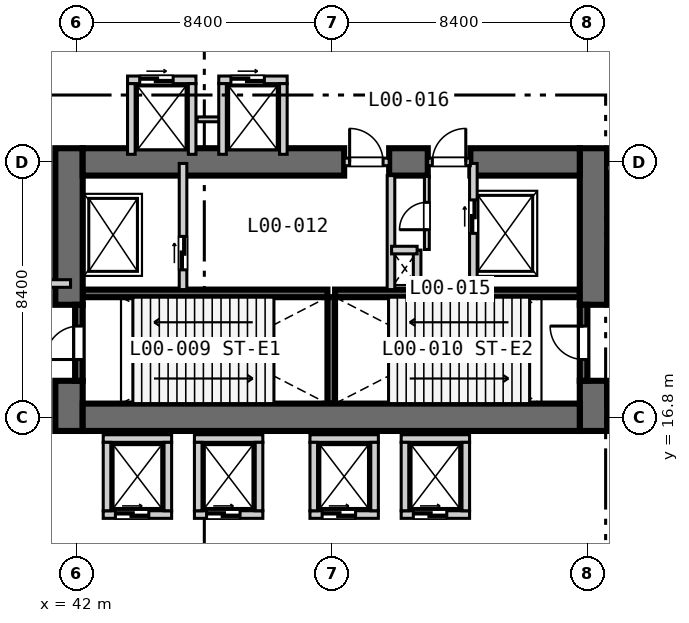
"""IFC4 building model, lengths in metres.
Left out: names, types, materials, properties, quantities, classifications, styles, units other than length and angle.
Written with IfcOpenShell. Run it as: python <this file> out.ifc"""

import sys

from ifc_helpers import new_model, si_unit, direction, frame, frame_2d, origin, place, context, subcontext, project, spatial, rectangle, extrude, element, fill, save


model = new_model("IFC4")
c1 = context("Model", 3, precision=1e-05, world=origin(), true_north=direction((0.0, 1.0)))
c2 = subcontext(c1, "Body", "Model", "MODEL_VIEW")
j1 = project(units=[si_unit("LENGTHUNIT", "METRE"), si_unit("PLANEANGLEUNIT", "RADIAN")], contexts=[c1])
p1 = place(None, origin())
s1 = spatial("IfcSite", under=j1, at=p1, CompositionType="ELEMENT")
p2 = place(p1, origin())
s2 = spatial("IfcBuilding", under=s1, at=p2, CompositionType="ELEMENT")
p3 = place(p2, origin())
s3 = spatial("IfcBuildingStorey", under=s2, at=p3, CompositionType="ELEMENT", Elevation=0.0)
for number, where, z_axis, x_axis in (
    (1, (42.2, 20.875, 0.0), (0.0, 0.0, 1.0), (1.0, 0.0, 0.0)),
    (2, (50.5, 20.875, 0.0), (0.0, 0.0, 1.0), (1.0, 0.0, 0.0)),
):
    element("IfcWall", number, at=place(p3, frame(where, z_axis=z_axis, x_axis=x_axis)), inside=s3, PredefinedType="SOLIDWALL", context=c2, shape_type="SweptSolid", body=[
        extrude(rectangle(XDim=8.05, YDim=0.25, at=frame_2d((4.025, 0.0))), origin(), (0.0, 0.0, 1.0), 5.65),
    ])
p4 = place(p3, frame((50.375, 17.25, 0.0), z_axis=(0.0, 0.0, 1.0), x_axis=(0.0, 1.0, 0.0)))
e3 = element("IfcWall", 3, at=p4, inside=s3, PredefinedType="SOLIDWALL", context=c2, shape_type="SweptSolid", body=[
    extrude(rectangle(XDim=3.5, YDim=0.25, at=frame_2d((1.75, 0.0))), origin(), (0.0, 0.0, 1.0), 5.65),
])
p5 = place(p3, frame((41.75, 16.35, 0.0), z_axis=(0.0, 0.0, 1.0), x_axis=(0.0, 1.0, 0.0)))
e4 = element("IfcWall", 4, at=p5, inside=s3, PredefinedType="SHEAR", context=c2, shape_type="SweptSolid", body=[
    extrude(rectangle(XDim=1.65, YDim=0.9, at=frame_2d((0.825, 0.0))), origin(), (0.0, 0.0, 1.0), 5.65),
])
p6 = place(p3, frame((41.75, 20.5, 0.0), z_axis=(0.0, 0.0, 1.0), x_axis=(0.0, 1.0, 0.0)))
e5 = element("IfcWall", 5, at=p6, inside=s3, PredefinedType="SHEAR", context=c2, shape_type="SweptSolid", body=[
    extrude(rectangle(XDim=5.15, YDim=0.9, at=frame_2d((2.575, 0.0))), origin(), (0.0, 0.0, 1.0), 5.65),
])
p7 = place(p3, frame((59.0, 16.35, 0.0), z_axis=(0.0, 0.0, 1.0), x_axis=(0.0, 1.0, 0.0)))
e6 = element("IfcWall", 6, at=p7, inside=s3, PredefinedType="SHEAR", context=c2, shape_type="SweptSolid", body=[
    extrude(rectangle(XDim=1.65, YDim=0.9, at=frame_2d((0.825, 0.0))), origin(), (0.0, 0.0, 1.0), 5.65),
])
p8 = place(p3, frame((59.0, 20.5, 0.0), z_axis=(0.0, 0.0, 1.0), x_axis=(0.0, 1.0, 0.0)))
e7 = element("IfcWall", 7, at=p8, inside=s3, PredefinedType="SHEAR", context=c2, shape_type="SweptSolid", body=[
    extrude(rectangle(XDim=5.15, YDim=0.9, at=frame_2d((2.575, 0.0))), origin(), (0.0, 0.0, 1.0), 5.65),
])
p9 = place(p3, frame((42.2, 16.8, 0.0), z_axis=(0.0, 0.0, 1.0), x_axis=(1.0, 0.0, 0.0)))
e8 = element("IfcWall", 8, at=p9, inside=s3, PredefinedType="SHEAR", context=c2, shape_type="SweptSolid", body=[
    extrude(rectangle(XDim=16.35, YDim=0.9, at=frame_2d((8.175, 0.0))), origin(), (0.0, 0.0, 1.0), 5.65),
])
p10 = place(p3, frame((42.2, 25.2, 0.0), z_axis=(0.0, 0.0, 1.0), x_axis=(1.0, 0.0, 0.0)))
e9 = element("IfcWall", 9, at=p10, inside=s3, PredefinedType="SHEAR", context=c2, shape_type="SweptSolid", body=[
    extrude(rectangle(XDim=8.6, YDim=0.9, at=frame_2d((4.3, 0.0))), origin(), (0.0, 0.0, 1.0), 5.65),
])
p11 = place(p3, frame((52.28, 25.2, 0.0), z_axis=(0.0, 0.0, 1.0), x_axis=(1.0, 0.0, 0.0)))
e10 = element("IfcWall", 10, at=p11, inside=s3, PredefinedType="SHEAR", context=c2, shape_type="SweptSolid", body=[
    extrude(rectangle(XDim=1.27, YDim=0.9, at=frame_2d((0.635, 0.0))), origin(), (0.0, 0.0, 1.0), 5.65),
])
p12 = place(p3, frame((54.95, 25.2, 0.0), z_axis=(0.0, 0.0, 1.0), x_axis=(1.0, 0.0, 0.0)))
e11 = element("IfcWall", 11, at=p12, inside=s3, PredefinedType="SHEAR", context=c2, shape_type="SweptSolid", body=[
    extrude(rectangle(XDim=3.6, YDim=0.9, at=frame_2d((1.8, 0.0))), origin(), (0.0, 0.0, 1.0), 5.65),
])
p13 = place(p3, frame((42.075, 18.0, 0.0), z_axis=(0.0, 0.0, 1.0), x_axis=(0.0, 1.0, 0.0)))
e12 = element("IfcWall", 12, at=p13, inside=s3, PredefinedType="SOLIDWALL", context=c2, shape_type="SweptSolid", body=[
    extrude(rectangle(XDim=2.5, YDim=0.25, at=frame_2d((1.25, 0.0))), origin(), (0.0, 0.0, 1.0), 5.65),
])
p14 = place(p13, frame((0.7, 0.0, 0.0)))
e13 = element("IfcOpeningElement", 13, at=p14, cuts=e12, PredefinedType="OPENING", context=c2, shape_type="SweptSolid", body=[
    extrude(rectangle(XDim=1.1, YDim=2.15, at=frame_2d((0.55, 1.075))), frame((0.0, 0.135, 0.0), z_axis=(0.0, -1.0, 0.0), x_axis=(1.0, 0.0, 0.0)), (0.0, 0.0, 1.0), 0.27),
])
p15 = place(p3, frame((58.675, 18.0, 0.0), z_axis=(0.0, 0.0, 1.0), x_axis=(0.0, 1.0, 0.0)))
e14 = element("IfcWall", 14, at=p15, inside=s3, PredefinedType="SOLIDWALL", context=c2, shape_type="SweptSolid", body=[
    extrude(rectangle(XDim=2.5, YDim=0.25, at=frame_2d((1.25, 0.0))), origin(), (0.0, 0.0, 1.0), 5.65),
])
p16 = place(p15, frame((0.7, 0.0, 0.0)))
e15 = element("IfcOpeningElement", 15, at=p16, cuts=e14, PredefinedType="OPENING", context=c2, shape_type="SweptSolid", body=[
    extrude(rectangle(XDim=1.1, YDim=2.15, at=frame_2d((0.55, 1.075))), frame((0.0, 0.135, 0.0), z_axis=(0.0, -1.0, 0.0), x_axis=(1.0, 0.0, 0.0)), (0.0, 0.0, 1.0), 0.27),
])
p17 = place(p3, frame((45.5, 21.0, 0.0), z_axis=(0.0, 0.0, 1.0), x_axis=(0.0, 1.0, 0.0)))
e16 = element("IfcWall", 16, at=p17, inside=s3, PredefinedType="SOLIDWALL", context=c2, shape_type="SweptSolid", body=[
    extrude(rectangle(XDim=4.15, YDim=0.25, at=frame_2d((2.075, 0.0))), origin(), (0.0, 0.0, 1.0), 5.65),
])
p18 = place(p17, frame((0.65, 0.0, 0.0)))
e17 = element("IfcOpeningElement", 17, at=p18, cuts=e16, PredefinedType="OPENING", context=c2, shape_type="SweptSolid", body=[
    extrude(rectangle(XDim=1.1, YDim=2.15, at=frame_2d((0.55, 1.075))), frame((0.0, 0.135, 0.0), z_axis=(0.0, -1.0, 0.0), x_axis=(1.0, 0.0, 0.0)), (0.0, 0.0, 1.0), 0.27),
])
p19 = place(p3, frame((50.8, 25.2, 0.0), z_axis=(0.0, 0.0, 1.0), x_axis=(1.0, 0.0, 0.0)))
e18 = element("IfcWall", 18, at=p19, inside=s3, PredefinedType="SOLIDWALL", context=c2, shape_type="SweptSolid", body=[
    extrude(rectangle(XDim=1.48, YDim=0.25, at=frame_2d((0.74, 0.0))), origin(), (0.0, 0.0, 1.0), 5.65),
])
p20 = place(p19, frame((0.18, 0.0, 0.0)))
e19 = element("IfcOpeningElement", 19, at=p20, cuts=e18, PredefinedType="OPENING", context=c2, shape_type="SweptSolid", body=[
    extrude(rectangle(XDim=1.1, YDim=2.15, at=frame_2d((0.55, 1.075))), frame((0.0, 0.135, 0.0), z_axis=(0.0, -1.0, 0.0), x_axis=(1.0, 0.0, 0.0)), (0.0, 0.0, 1.0), 0.27),
])
p21 = place(p3, frame((52.34, 21.0, 0.0), z_axis=(0.0, 0.0, 1.0), x_axis=(0.0, 1.0, 0.0)))
e20 = element("IfcWall", 20, at=p21, inside=s3, PredefinedType="SOLIDWALL", context=c2, shape_type="SweptSolid", body=[
    extrude(rectangle(XDim=3.75, YDim=0.25, at=frame_2d((1.875, 0.0))), origin(), (0.0, 0.0, 1.0), 5.65),
])
p22 = place(p3, frame((55.05, 21.0, 0.0), z_axis=(0.0, 0.0, 1.0), x_axis=(0.0, 1.0, 0.0)))
e21 = element("IfcWall", 21, at=p22, inside=s3, PredefinedType="SOLIDWALL", context=c2, shape_type="SweptSolid", body=[
    extrude(rectangle(XDim=4.15, YDim=0.25, at=frame_2d((2.075, 0.0))), origin(), (0.0, 0.0, 1.0), 5.65),
])
p23 = place(p22, frame((1.85, 0.0, 0.0)))
e22 = element("IfcOpeningElement", 22, at=p23, cuts=e21, PredefinedType="OPENING", context=c2, shape_type="SweptSolid", body=[
    extrude(rectangle(XDim=1.1, YDim=2.15, at=frame_2d((0.55, 1.075))), frame((0.0, 0.135, 0.0), z_axis=(0.0, -1.0, 0.0), x_axis=(1.0, 0.0, 0.0)), (0.0, 0.0, 1.0), 0.27),
])
p24 = place(p3, frame((53.55, 25.2, 0.0), z_axis=(0.0, 0.0, 1.0), x_axis=(1.0, 0.0, 0.0)))
e23 = element("IfcWall", 23, at=p24, inside=s3, PredefinedType="SOLIDWALL", context=c2, shape_type="SweptSolid", body=[
    extrude(rectangle(XDim=1.4, YDim=0.25, at=frame_2d((0.7, 0.0))), origin(), (0.0, 0.0, 1.0), 5.65),
])
p25 = place(p24, frame((0.15, 0.0, 0.0)))
e24 = element("IfcOpeningElement", 24, at=p25, cuts=e23, PredefinedType="OPENING", context=c2, shape_type="SweptSolid", body=[
    extrude(rectangle(XDim=1.1, YDim=2.15, at=frame_2d((0.55, 1.075))), frame((0.0, 0.135, 0.0), z_axis=(0.0, -1.0, 0.0), x_axis=(1.0, 0.0, 0.0)), (0.0, 0.0, 1.0), 0.27),
])
p26 = place(p3, frame((53.2, 21.0, 0.0), z_axis=(0.0, 0.0, 1.0), x_axis=(0.0, 1.0, 0.0)))
e25 = element("IfcWall", 25, at=p26, inside=s3, PredefinedType="SOLIDWALL", context=c2, shape_type="SweptSolid", body=[
    extrude(rectangle(XDim=1.3, YDim=0.25, at=frame_2d((0.65, 0.0))), origin(), (0.0, 0.0, 1.0), 5.65),
])
p27 = place(p3, frame((52.36, 22.3, 0.0), z_axis=(0.0, 0.0, 1.0), x_axis=(1.0, 0.0, 0.0)))
e26 = element("IfcWall", 26, at=p27, inside=s3, PredefinedType="SOLIDWALL", context=c2, shape_type="SweptSolid", body=[
    extrude(rectangle(XDim=0.84, YDim=0.25, at=frame_2d((0.42, 0.0))), origin(), (0.0, 0.0, 1.0), 5.65),
])
p28 = place(p3, frame((53.52, 22.32, 0.0), z_axis=(0.0, 0.0, 1.0), x_axis=(0.0, 1.0, 0.0)))
e27 = element("IfcWall", 27, at=p28, inside=s3, PredefinedType="PARTITIONING", context=c2, shape_type="SweptSolid", body=[
    extrude(rectangle(XDim=2.4, YDim=0.16, at=frame_2d((1.2, 0.0))), origin(), (0.0, 0.0, 1.0), 5.65),
])
p29 = place(p28, frame((0.65, 0.0, 0.0)))
e28 = element("IfcOpeningElement", 28, at=p29, cuts=e27, PredefinedType="OPENING", context=c2, shape_type="SweptSolid", body=[
    extrude(rectangle(XDim=0.9, YDim=2.1, at=frame_2d((0.45, 1.05))), frame((0.0, 0.09, 0.0), z_axis=(0.0, -1.0, 0.0), x_axis=(1.0, 0.0, 0.0)), (0.0, 0.0, 1.0), 0.18),
])
p30 = place(p3, frame((42.875, 13.6, 0.0), z_axis=(0.0, 0.0, 1.0), x_axis=(1.0, 0.0, 0.0)))
e29 = element("IfcWall", 29, at=p30, inside=s3, PredefinedType="SOLIDWALL", context=c2, shape_type="SweptSolid", body=[
    extrude(rectangle(XDim=2.25, YDim=0.25, at=frame_2d((1.125, 0.0))), origin(), (0.0, 0.0, 1.0), 5.65),
])
p31 = place(p30, frame((0.4, 0.0, 0.0)))
e30 = element("IfcOpeningElement", 30, at=p31, cuts=e29, PredefinedType="OPENING", context=c2, shape_type="SweptSolid", body=[
    extrude(rectangle(XDim=1.1, YDim=2.15, at=frame_2d((0.55, 1.075))), frame((0.0, 0.135, 0.0), z_axis=(0.0, -1.0, 0.0), x_axis=(1.0, 0.0, 0.0)), (0.0, 0.0, 1.0), 0.27),
])
for number, where, z_axis, x_axis in (
    (31, (42.875, 16.1, 0.0), (0.0, 0.0, 1.0), (1.0, 0.0, 0.0)),
    (32, (43.0, 13.725, 0.0), (0.0, 0.0, 1.0), (0.0, 1.0, 0.0)),
    (33, (45.0, 13.725, 0.0), (0.0, 0.0, 1.0), (0.0, 1.0, 0.0)),
):
    element("IfcWall", number, at=place(p3, frame(where, z_axis=z_axis, x_axis=x_axis)), inside=s3, PredefinedType="SOLIDWALL", context=c2, shape_type="SweptSolid", body=[
        extrude(rectangle(XDim=2.25, YDim=0.25, at=frame_2d((1.125, 0.0))), origin(), (0.0, 0.0, 1.0), 5.65),
    ])
p32 = place(p3, frame((45.875, 13.6, 0.0), z_axis=(0.0, 0.0, 1.0), x_axis=(1.0, 0.0, 0.0)))
e34 = element("IfcWall", 34, at=p32, inside=s3, PredefinedType="SOLIDWALL", context=c2, shape_type="SweptSolid", body=[
    extrude(rectangle(XDim=2.25, YDim=0.25, at=frame_2d((1.125, 0.0))), origin(), (0.0, 0.0, 1.0), 5.65),
])
p33 = place(p32, frame((0.4, 0.0, 0.0)))
e35 = element("IfcOpeningElement", 35, at=p33, cuts=e34, PredefinedType="OPENING", context=c2, shape_type="SweptSolid", body=[
    extrude(rectangle(XDim=1.1, YDim=2.15, at=frame_2d((0.55, 1.075))), frame((0.0, 0.135, 0.0), z_axis=(0.0, -1.0, 0.0), x_axis=(1.0, 0.0, 0.0)), (0.0, 0.0, 1.0), 0.27),
])
for number, where, z_axis, x_axis in (
    (36, (45.875, 16.1, 0.0), (0.0, 0.0, 1.0), (1.0, 0.0, 0.0)),
    (37, (46.0, 13.725, 0.0), (0.0, 0.0, 1.0), (0.0, 1.0, 0.0)),
    (38, (48.0, 13.725, 0.0), (0.0, 0.0, 1.0), (0.0, 1.0, 0.0)),
):
    element("IfcWall", number, at=place(p3, frame(where, z_axis=z_axis, x_axis=x_axis)), inside=s3, PredefinedType="SOLIDWALL", context=c2, shape_type="SweptSolid", body=[
        extrude(rectangle(XDim=2.25, YDim=0.25, at=frame_2d((1.125, 0.0))), origin(), (0.0, 0.0, 1.0), 5.65),
    ])
p34 = place(p3, frame((49.675, 13.6, 0.0), z_axis=(0.0, 0.0, 1.0), x_axis=(1.0, 0.0, 0.0)))
e39 = element("IfcWall", 39, at=p34, inside=s3, PredefinedType="SOLIDWALL", context=c2, shape_type="SweptSolid", body=[
    extrude(rectangle(XDim=2.25, YDim=0.25, at=frame_2d((1.125, 0.0))), origin(), (0.0, 0.0, 1.0), 5.65),
])
p35 = place(p34, frame((0.4, 0.0, 0.0)))
e40 = element("IfcOpeningElement", 40, at=p35, cuts=e39, PredefinedType="OPENING", context=c2, shape_type="SweptSolid", body=[
    extrude(rectangle(XDim=1.1, YDim=2.15, at=frame_2d((0.55, 1.075))), frame((0.0, 0.135, 0.0), z_axis=(0.0, -1.0, 0.0), x_axis=(1.0, 0.0, 0.0)), (0.0, 0.0, 1.0), 0.27),
])
for number, where, z_axis, x_axis in (
    (41, (49.675, 16.1, 0.0), (0.0, 0.0, 1.0), (1.0, 0.0, 0.0)),
    (42, (49.8, 13.725, 0.0), (0.0, 0.0, 1.0), (0.0, 1.0, 0.0)),
    (43, (51.8, 13.725, 0.0), (0.0, 0.0, 1.0), (0.0, 1.0, 0.0)),
):
    element("IfcWall", number, at=place(p3, frame(where, z_axis=z_axis, x_axis=x_axis)), inside=s3, PredefinedType="SOLIDWALL", context=c2, shape_type="SweptSolid", body=[
        extrude(rectangle(XDim=2.25, YDim=0.25, at=frame_2d((1.125, 0.0))), origin(), (0.0, 0.0, 1.0), 5.65),
    ])
p36 = place(p3, frame((52.675, 13.6, 0.0), z_axis=(0.0, 0.0, 1.0), x_axis=(1.0, 0.0, 0.0)))
e44 = element("IfcWall", 44, at=p36, inside=s3, PredefinedType="SOLIDWALL", context=c2, shape_type="SweptSolid", body=[
    extrude(rectangle(XDim=2.25, YDim=0.25, at=frame_2d((1.125, 0.0))), origin(), (0.0, 0.0, 1.0), 5.65),
])
p37 = place(p36, frame((0.4, 0.0, 0.0)))
e45 = element("IfcOpeningElement", 45, at=p37, cuts=e44, PredefinedType="OPENING", context=c2, shape_type="SweptSolid", body=[
    extrude(rectangle(XDim=1.1, YDim=2.15, at=frame_2d((0.55, 1.075))), frame((0.0, 0.135, 0.0), z_axis=(0.0, -1.0, 0.0), x_axis=(1.0, 0.0, 0.0)), (0.0, 0.0, 1.0), 0.27),
])
for number, where, z_axis, x_axis in (
    (46, (52.675, 16.1, 0.0), (0.0, 0.0, 1.0), (1.0, 0.0, 0.0)),
    (47, (52.8, 13.725, 0.0), (0.0, 0.0, 1.0), (0.0, 1.0, 0.0)),
    (48, (54.8, 13.725, 0.0), (0.0, 0.0, 1.0), (0.0, 1.0, 0.0)),
):
    element("IfcWall", number, at=place(p3, frame(where, z_axis=z_axis, x_axis=x_axis)), inside=s3, PredefinedType="SOLIDWALL", context=c2, shape_type="SweptSolid", body=[
        extrude(rectangle(XDim=2.25, YDim=0.25, at=frame_2d((1.125, 0.0))), origin(), (0.0, 0.0, 1.0), 5.65),
    ])
p38 = place(p3, frame((43.675, 27.9, 0.0), z_axis=(0.0, 0.0, 1.0), x_axis=(1.0, 0.0, 0.0)))
e49 = element("IfcWall", 49, at=p38, inside=s3, PredefinedType="SOLIDWALL", context=c2, shape_type="SweptSolid", body=[
    extrude(rectangle(XDim=2.25, YDim=0.25, at=frame_2d((1.125, 0.0))), origin(), (0.0, 0.0, 1.0), 5.65),
])
p39 = place(p38, frame((0.4, 0.0, 0.0)))
e50 = element("IfcOpeningElement", 50, at=p39, cuts=e49, PredefinedType="OPENING", context=c2, shape_type="SweptSolid", body=[
    extrude(rectangle(XDim=1.1, YDim=2.15, at=frame_2d((0.55, 1.075))), frame((0.0, 0.135, 0.0), z_axis=(0.0, -1.0, 0.0), x_axis=(1.0, 0.0, 0.0)), (0.0, 0.0, 1.0), 0.27),
])
for number, where, z_axis, x_axis in (
    (51, (43.8, 25.45, 0.0), (0.0, 0.0, 1.0), (0.0, 1.0, 0.0)),
    (52, (45.8, 25.45, 0.0), (0.0, 0.0, 1.0), (0.0, 1.0, 0.0)),
):
    element("IfcWall", number, at=place(p3, frame(where, z_axis=z_axis, x_axis=x_axis)), inside=s3, PredefinedType="SOLIDWALL", context=c2, shape_type="SweptSolid", body=[
        extrude(rectangle(XDim=2.325, YDim=0.25, at=frame_2d((1.163, 0.0))), origin(), (0.0, 0.0, 1.0), 5.65),
    ])
p40 = place(p3, frame((45.96, 26.6, 0.0), z_axis=(0.0, 0.0, 1.0), x_axis=(1.0, 0.0, 0.0)))
e53 = element("IfcWall", 53, at=p40, inside=s3, PredefinedType="PARTITIONING", context=c2, shape_type="SweptSolid", body=[
    extrude(rectangle(XDim=0.88, YDim=0.16, at=frame_2d((0.44, 0.0))), origin(), (0.0, 0.0, 1.0), 5.65),
])
p41 = place(p3, frame((46.675, 27.9, 0.0), z_axis=(0.0, 0.0, 1.0), x_axis=(1.0, 0.0, 0.0)))
e54 = element("IfcWall", 54, at=p41, inside=s3, PredefinedType="SOLIDWALL", context=c2, shape_type="SweptSolid", body=[
    extrude(rectangle(XDim=2.25, YDim=0.25, at=frame_2d((1.125, 0.0))), origin(), (0.0, 0.0, 1.0), 5.65),
])
p42 = place(p41, frame((0.4, 0.0, 0.0)))
e55 = element("IfcOpeningElement", 55, at=p42, cuts=e54, PredefinedType="OPENING", context=c2, shape_type="SweptSolid", body=[
    extrude(rectangle(XDim=1.1, YDim=2.15, at=frame_2d((0.55, 1.075))), frame((0.0, 0.135, 0.0), z_axis=(0.0, -1.0, 0.0), x_axis=(1.0, 0.0, 0.0)), (0.0, 0.0, 1.0), 0.27),
])
for number, where, z_axis, x_axis in (
    (56, (46.8, 25.45, 0.0), (0.0, 0.0, 1.0), (0.0, 1.0, 0.0)),
    (57, (48.8, 25.45, 0.0), (0.0, 0.0, 1.0), (0.0, 1.0, 0.0)),
):
    element("IfcWall", number, at=place(p3, frame(where, z_axis=z_axis, x_axis=x_axis)), inside=s3, PredefinedType="SOLIDWALL", context=c2, shape_type="SweptSolid", body=[
        extrude(rectangle(XDim=2.325, YDim=0.25, at=frame_2d((1.163, 0.0))), origin(), (0.0, 0.0, 1.0), 5.65),
    ])
p43 = place(p3, frame((39.2, 21.2, 0.0), z_axis=(0.0, 0.0, 1.0), x_axis=(1.0, 0.0, 0.0)))
e58 = element("IfcWall", 58, at=p43, inside=s3, PredefinedType="SOLIDWALL", context=c2, shape_type="SweptSolid", body=[
    extrude(rectangle(XDim=2.6, YDim=0.25, at=frame_2d((1.3, 0.0))), origin(), (0.0, 0.0, 1.0), 5.65),
])
p44 = place(p3, frame((59.45, 25.0, 0.0), z_axis=(0.0, 0.0, 1.0), x_axis=(1.0, 0.0, 0.0)))
e59 = element("IfcWall", 59, at=p44, inside=s3, PredefinedType="SOLIDWALL", context=c2, shape_type="SweptSolid", body=[
    extrude(rectangle(XDim=2.0, YDim=0.25, at=frame_2d((1.0, 0.0))), origin(), (0.0, 0.0, 1.0), 4.8),
])
p45 = place(p44, frame((0.4, 0.0, 0.0)))
e60 = element("IfcOpeningElement", 60, at=p45, cuts=e59, PredefinedType="OPENING", context=c2, shape_type="SweptSolid", body=[
    extrude(rectangle(XDim=1.2, YDim=2.15, at=frame_2d((0.6, 1.075))), frame((0.0, 0.135, 0.0), z_axis=(0.0, -1.0, 0.0), x_axis=(1.0, 0.0, 0.0)), (0.0, 0.0, 1.0), 0.27),
])
p46 = place(p14, origin())
e61 = element("IfcDoor", 61, at=p46, inside=s3, OperationType="SINGLE_SWING_LEFT", PredefinedType="DOOR", context=c2, shape_type="SweptSolid", body=[
    extrude(rectangle(XDim=1.1, YDim=2.15, at=frame_2d((0.55, 1.075))), frame((0.0, 0.025, 0.0), z_axis=(0.0, -1.0, 0.0), x_axis=(1.0, 0.0, 0.0)), (0.0, 0.0, 1.0), 0.05),
])
fill(e13, e61)
p47 = place(p16, origin())
e62 = element("IfcDoor", 62, at=p47, inside=s3, OperationType="SINGLE_SWING_RIGHT", PredefinedType="DOOR", context=c2, shape_type="SweptSolid", body=[
    extrude(rectangle(XDim=1.1, YDim=2.15, at=frame_2d((0.55, 1.075))), frame((0.0, 0.025, 0.0), z_axis=(0.0, -1.0, 0.0), x_axis=(1.0, 0.0, 0.0)), (0.0, 0.0, 1.0), 0.05),
])
fill(e15, e62)
p48 = place(p18, origin())
e63 = element("IfcDoor", 63, at=p48, inside=s3, OperationType="SLIDING_TO_LEFT", PredefinedType="DOOR", context=c2, shape_type="SweptSolid", body=[
    extrude(rectangle(XDim=1.1, YDim=2.15, at=frame_2d((0.55, 1.075))), frame((0.0, 0.025, 0.0), z_axis=(0.0, -1.0, 0.0), x_axis=(1.0, 0.0, 0.0)), (0.0, 0.0, 1.0), 0.05),
])
fill(e17, e63)
p49 = place(p20, origin())
e64 = element("IfcDoor", 64, at=p49, inside=s3, OperationType="SINGLE_SWING_LEFT", PredefinedType="DOOR", context=c2, shape_type="SweptSolid", body=[
    extrude(rectangle(XDim=1.1, YDim=2.15, at=frame_2d((0.55, 1.075))), frame((0.0, 0.025, 0.0), z_axis=(0.0, -1.0, 0.0), x_axis=(1.0, 0.0, 0.0)), (0.0, 0.0, 1.0), 0.05),
])
fill(e19, e64)
p50 = place(p23, origin())
e65 = element("IfcDoor", 65, at=p50, inside=s3, OperationType="SLIDING_TO_LEFT", PredefinedType="DOOR", context=c2, shape_type="SweptSolid", body=[
    extrude(rectangle(XDim=1.1, YDim=2.15, at=frame_2d((0.55, 1.075))), frame((0.0, 0.025, 0.0), z_axis=(0.0, -1.0, 0.0), x_axis=(1.0, 0.0, 0.0)), (0.0, 0.0, 1.0), 0.05),
])
fill(e22, e65)
p51 = place(p25, origin())
e66 = element("IfcDoor", 66, at=p51, inside=s3, OperationType="SINGLE_SWING_RIGHT", PredefinedType="DOOR", context=c2, shape_type="SweptSolid", body=[
    extrude(rectangle(XDim=1.1, YDim=2.15, at=frame_2d((0.55, 1.075))), frame((0.0, 0.025, 0.0), z_axis=(0.0, -1.0, 0.0), x_axis=(1.0, 0.0, 0.0)), (0.0, 0.0, 1.0), 0.05),
])
fill(e24, e66)
p52 = place(p29, origin())
e67 = element("IfcDoor", 67, at=p52, inside=s3, OperationType="SINGLE_SWING_LEFT", PredefinedType="DOOR", context=c2, shape_type="SweptSolid", body=[
    extrude(rectangle(XDim=0.9, YDim=2.1, at=frame_2d((0.45, 1.05))), frame((0.0, 0.025, 0.0), z_axis=(0.0, -1.0, 0.0), x_axis=(1.0, 0.0, 0.0)), (0.0, 0.0, 1.0), 0.05),
])
fill(e28, e67)
p53 = place(p31, origin())
e68 = element("IfcDoor", 68, at=p53, inside=s3, OperationType="SLIDING_TO_LEFT", PredefinedType="DOOR", context=c2, shape_type="SweptSolid", body=[
    extrude(rectangle(XDim=1.1, YDim=2.15, at=frame_2d((0.55, 1.075))), frame((0.0, 0.025, 0.0), z_axis=(0.0, -1.0, 0.0), x_axis=(1.0, 0.0, 0.0)), (0.0, 0.0, 1.0), 0.05),
])
fill(e30, e68)
p54 = place(p33, origin())
e69 = element("IfcDoor", 69, at=p54, inside=s3, OperationType="SLIDING_TO_LEFT", PredefinedType="DOOR", context=c2, shape_type="SweptSolid", body=[
    extrude(rectangle(XDim=1.1, YDim=2.15, at=frame_2d((0.55, 1.075))), frame((0.0, 0.025, 0.0), z_axis=(0.0, -1.0, 0.0), x_axis=(1.0, 0.0, 0.0)), (0.0, 0.0, 1.0), 0.05),
])
fill(e35, e69)
p55 = place(p35, origin())
e70 = element("IfcDoor", 70, at=p55, inside=s3, OperationType="SLIDING_TO_LEFT", PredefinedType="DOOR", context=c2, shape_type="SweptSolid", body=[
    extrude(rectangle(XDim=1.1, YDim=2.15, at=frame_2d((0.55, 1.075))), frame((0.0, 0.025, 0.0), z_axis=(0.0, -1.0, 0.0), x_axis=(1.0, 0.0, 0.0)), (0.0, 0.0, 1.0), 0.05),
])
fill(e40, e70)
p56 = place(p37, origin())
e71 = element("IfcDoor", 71, at=p56, inside=s3, OperationType="SLIDING_TO_LEFT", PredefinedType="DOOR", context=c2, shape_type="SweptSolid", body=[
    extrude(rectangle(XDim=1.1, YDim=2.15, at=frame_2d((0.55, 1.075))), frame((0.0, 0.025, 0.0), z_axis=(0.0, -1.0, 0.0), x_axis=(1.0, 0.0, 0.0)), (0.0, 0.0, 1.0), 0.05),
])
fill(e45, e71)
p57 = place(p39, origin())
e72 = element("IfcDoor", 72, at=p57, inside=s3, OperationType="SLIDING_TO_LEFT", PredefinedType="DOOR", context=c2, shape_type="SweptSolid", body=[
    extrude(rectangle(XDim=1.1, YDim=2.15, at=frame_2d((0.55, 1.075))), frame((0.0, 0.025, 0.0), z_axis=(0.0, -1.0, 0.0), x_axis=(1.0, 0.0, 0.0)), (0.0, 0.0, 1.0), 0.05),
])
fill(e50, e72)
p58 = place(p42, origin())
e73 = element("IfcDoor", 73, at=p58, inside=s3, OperationType="SLIDING_TO_LEFT", PredefinedType="DOOR", context=c2, shape_type="SweptSolid", body=[
    extrude(rectangle(XDim=1.1, YDim=2.15, at=frame_2d((0.55, 1.075))), frame((0.0, 0.025, 0.0), z_axis=(0.0, -1.0, 0.0), x_axis=(1.0, 0.0, 0.0)), (0.0, 0.0, 1.0), 0.05),
])
fill(e55, e73)
save(model, sys.argv[1])
